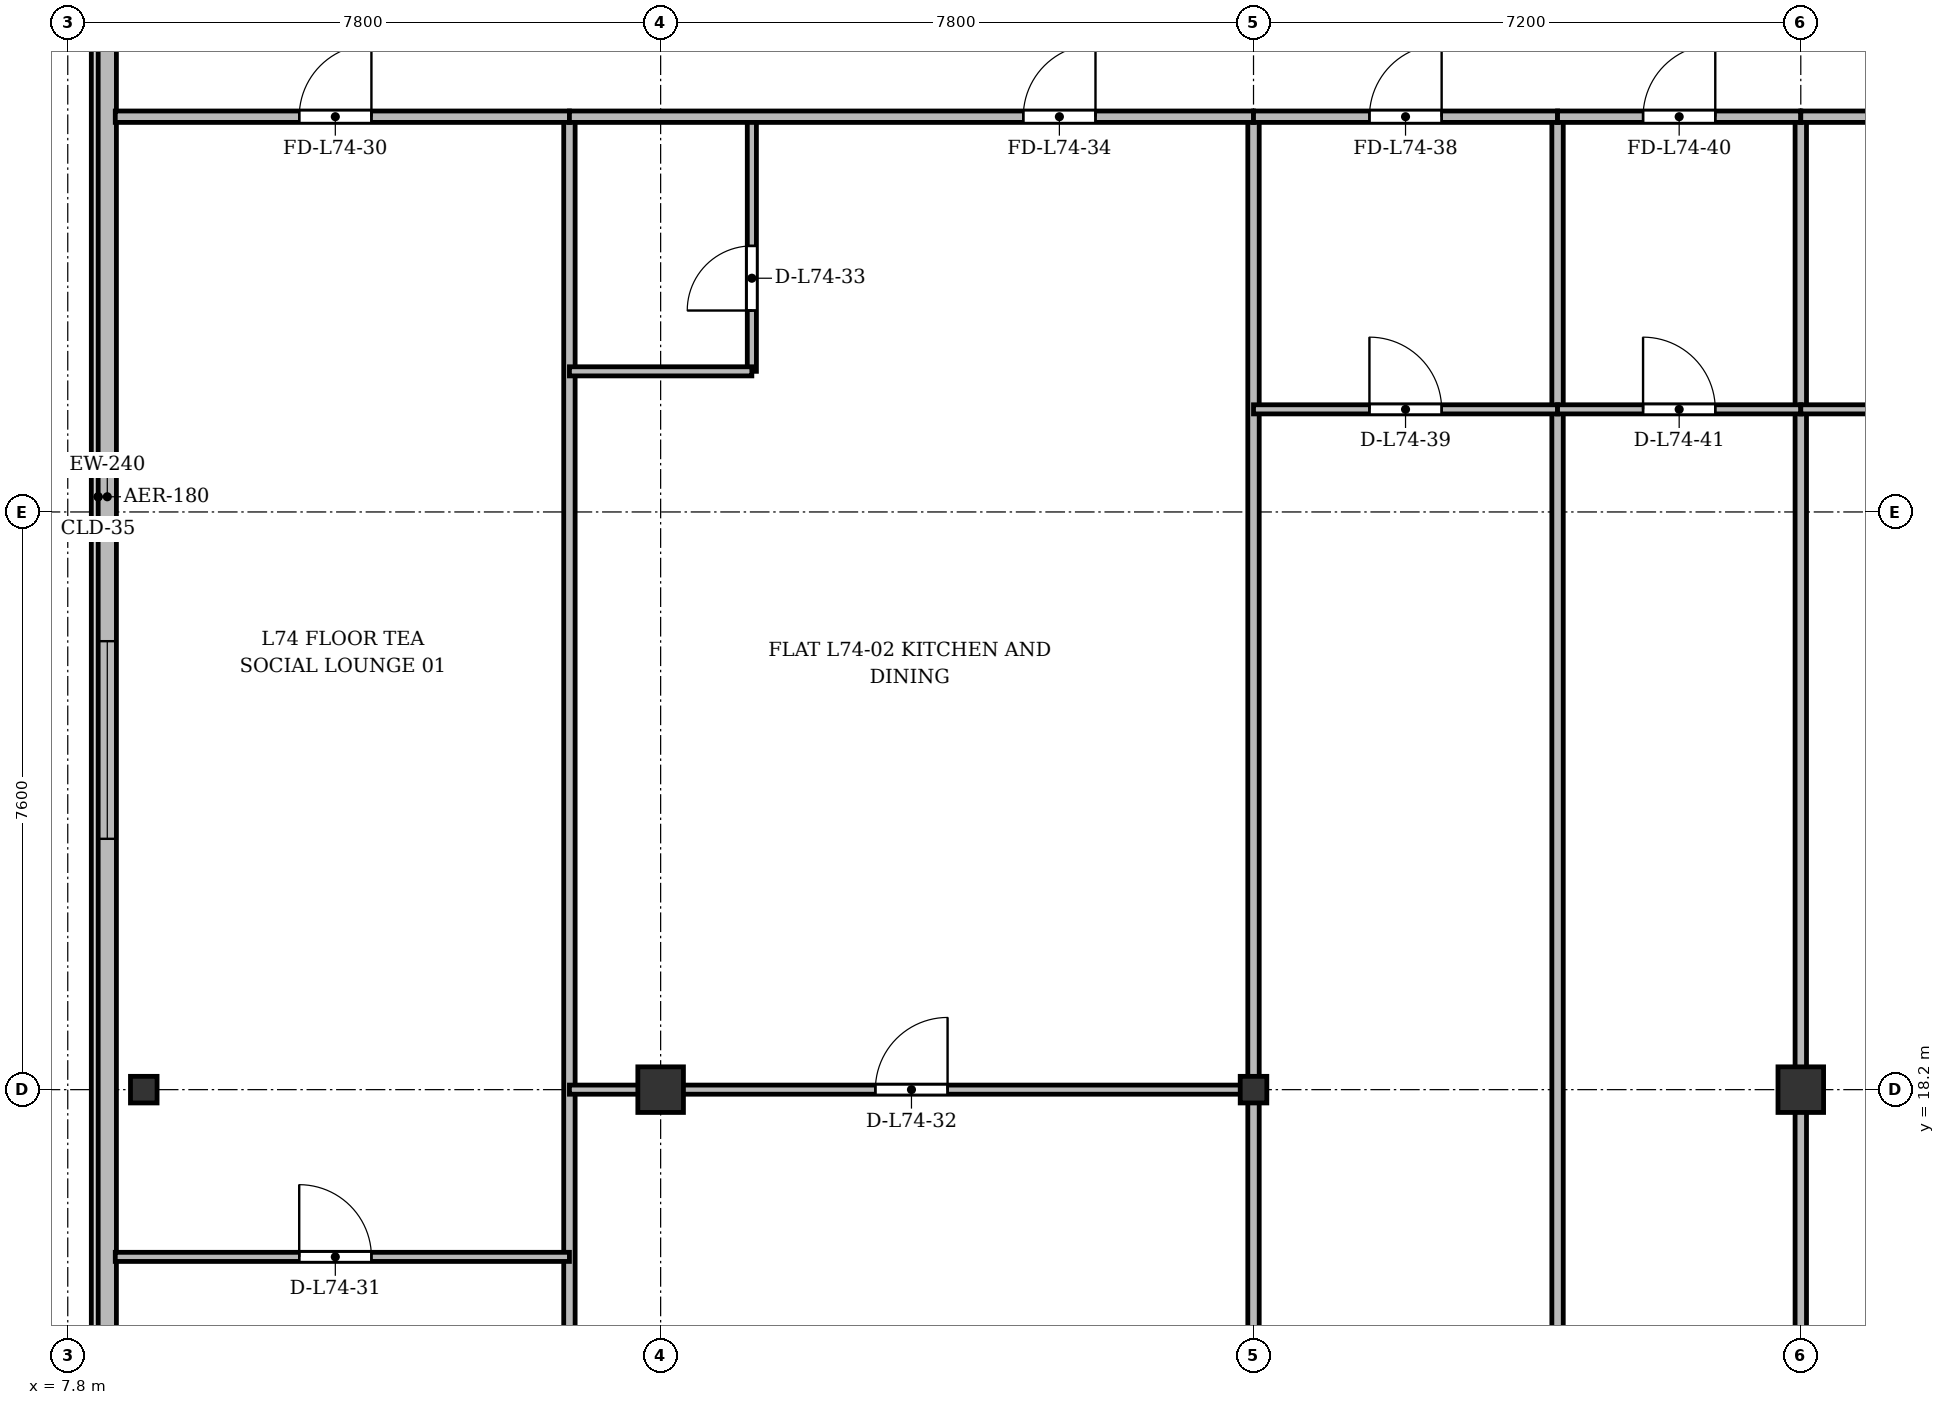
"""IFC4 building model, lengths in metres.
Left out: names, types, materials, properties, quantities, classifications, styles, units other than length and angle.
Written with IfcOpenShell. Run it as: python <this file> out.ifc"""

import sys

from ifc_helpers import new_model, si_unit, direction, frame, frame_2d, origin, origin_2d, place, context, subcontext, project, spatial, rectangle, i_section, extrude, source, transform, mapped, element, fill, save


model = new_model("IFC4")
c1 = context("Model", 3, precision=1e-05, world=origin(), true_north=direction((0.0, 1.0)))
c2 = subcontext(c1, "Body", "Model", "MODEL_VIEW")
j1 = project(units=[si_unit("LENGTHUNIT", "METRE"), si_unit("PLANEANGLEUNIT", "RADIAN")], contexts=[c1])
p1 = place(None, origin())
s1 = spatial("IfcSite", under=j1, at=p1, CompositionType="ELEMENT")
p2 = place(p1, origin())
s2 = spatial("IfcBuilding", under=s1, at=p2, CompositionType="ELEMENT")
p3 = place(p2, frame((0.0, 0.0, 284.7)))
s3 = spatial("IfcBuildingStorey", under=s2, at=p3, CompositionType="ELEMENT", Elevation=284.7)
m1 = source(origin(), c2, "Body", "SweptSolid", [
    extrude(i_section(OverallWidth=0.35, OverallDepth=0.35, WebThickness=0.018, FlangeThickness=0.028, at=origin_2d()), origin(), (0.0, 0.0, 1.0), 3.6),
])
p4 = place(p3, frame((8.8, 18.2, 0.0), z_axis=(0.0, 0.0, 1.0), x_axis=(1.0, 0.0, 0.0)))
e1 = element("IfcColumn", 1, at=p4, inside=s3, PredefinedType="COLUMN", context=c2, shape_type="MappedRepresentation", body=[
    mapped(m1, transform((0.0, 0.0, 0.0), x_axis=(1.0, 0.0, 0.0), y_axis=(0.0, 1.0, 0.0), z_axis=(0.0, 0.0, 1.0), scale=1.0)),
])
m2 = source(origin(), c2, "Body", "SweptSolid", [
    extrude(rectangle(XDim=0.6, YDim=0.6, at=origin_2d()), origin(), (0.0, 0.0, 1.0), 3.6),
])
p5 = place(p3, frame((15.6, 18.2, 0.0), z_axis=(0.0, 0.0, 1.0), x_axis=(1.0, 0.0, 0.0)))
e2 = element("IfcColumn", 2, at=p5, inside=s3, PredefinedType="COLUMN", context=c2, shape_type="MappedRepresentation", body=[
    mapped(m2, transform((0.0, 0.0, 0.0), x_axis=(1.0, 0.0, 0.0), y_axis=(0.0, 1.0, 0.0), z_axis=(0.0, 0.0, 1.0), scale=1.0)),
])
p6 = place(p3, frame((23.4, 18.2, 0.0), z_axis=(0.0, 0.0, 1.0), x_axis=(1.0, 0.0, 0.0)))
e3 = element("IfcColumn", 3, at=p6, inside=s3, PredefinedType="COLUMN", context=c2, shape_type="MappedRepresentation", body=[
    mapped(m1, transform((0.0, 0.0, 0.0), x_axis=(1.0, 0.0, 0.0), y_axis=(0.0, 1.0, 0.0), z_axis=(0.0, 0.0, 1.0), scale=1.0)),
])
p7 = place(p3, frame((30.6, 18.2, 0.0), z_axis=(0.0, 0.0, 1.0), x_axis=(1.0, 0.0, 0.0)))
e4 = element("IfcColumn", 4, at=p7, inside=s3, PredefinedType="COLUMN", context=c2, shape_type="MappedRepresentation", body=[
    mapped(m2, transform((0.0, 0.0, 0.0), x_axis=(1.0, 0.0, 0.0), y_axis=(0.0, 1.0, 0.0), z_axis=(0.0, 0.0, 1.0), scale=1.0)),
])
p8 = place(p3, frame((8.32, 6.5, 0.0), z_axis=(0.0, 0.0, 1.0), x_axis=(0.0, 1.0, 0.0)))
e5 = element("IfcWall", 5, at=p8, inside=s3, PredefinedType="SOLIDWALL", context=c2, shape_type="SweptSolid", body=[
    extrude(rectangle(XDim=39.0, YDim=0.24, at=frame_2d((19.5, 0.0))), origin(), (0.0, 0.0, 1.0), 3.37),
])
p9 = place(p8, frame((1.45, 0.0, 0.92)))
e6 = element("IfcOpeningElement", 6, at=p9, cuts=e5, PredefinedType="OPENING", context=c2, shape_type="SweptSolid", body=[
    extrude(rectangle(XDim=1.2, YDim=1.65, at=frame_2d((0.6, 0.825))), frame((0.0, 0.13, 0.0), z_axis=(0.0, -1.0, 0.0), x_axis=(1.0, 0.0, 0.0)), (0.0, 0.0, 1.0), 0.26),
])
p10 = place(p8, frame((3.6, 0.0, 0.92)))
e7 = element("IfcOpeningElement", 7, at=p10, cuts=e5, PredefinedType="OPENING", context=c2, shape_type="SweptSolid", body=[
    extrude(rectangle(XDim=2.6, YDim=1.9, at=frame_2d((1.3, 0.95))), frame((0.0, 0.13, 0.0), z_axis=(0.0, -1.0, 0.0), x_axis=(1.0, 0.0, 0.0)), (0.0, 0.0, 1.0), 0.26),
])
p11 = place(p8, frame((15.0, 0.0, 0.92)))
e8 = element("IfcOpeningElement", 8, at=p11, cuts=e5, PredefinedType="OPENING", context=c2, shape_type="SweptSolid", body=[
    extrude(rectangle(XDim=2.6, YDim=1.9, at=frame_2d((1.3, 0.95))), frame((0.0, 0.13, 0.0), z_axis=(0.0, -1.0, 0.0), x_axis=(1.0, 0.0, 0.0)), (0.0, 0.0, 1.0), 0.26),
])
p12 = place(p8, frame((29.0, 0.0, 0.92)))
e9 = element("IfcOpeningElement", 9, at=p12, cuts=e5, PredefinedType="OPENING", context=c2, shape_type="SweptSolid", body=[
    extrude(rectangle(XDim=2.6, YDim=1.9, at=frame_2d((1.3, 0.95))), frame((0.0, 0.13, 0.0), z_axis=(0.0, -1.0, 0.0), x_axis=(1.0, 0.0, 0.0)), (0.0, 0.0, 1.0), 0.26),
])
p13 = place(p8, frame((36.65, 0.0, 0.92)))
e10 = element("IfcOpeningElement", 10, at=p13, cuts=e5, PredefinedType="OPENING", context=c2, shape_type="SweptSolid", body=[
    extrude(rectangle(XDim=1.2, YDim=1.65, at=frame_2d((0.6, 0.825))), frame((0.0, 0.13, 0.0), z_axis=(0.0, -1.0, 0.0), x_axis=(1.0, 0.0, 0.0)), (0.0, 0.0, 1.0), 0.26),
])
p14 = place(p3, frame((14.4, 3.725, 0.0), z_axis=(0.0, 0.0, 1.0), x_axis=(0.0, 1.0, 0.0)))
e11 = element("IfcWall", 11, at=p14, inside=s3, PredefinedType="PARTITIONING", context=c2, shape_type="SweptSolid", body=[
    extrude(rectangle(XDim=27.275, YDim=0.15, at=frame_2d((13.637, 0.0))), origin(), (0.0, 0.0, 1.0), 2.92),
])
p15 = place(p3, frame((23.4, 3.725, 0.0), z_axis=(0.0, 0.0, 1.0), x_axis=(0.0, 1.0, 0.0)))
e12 = element("IfcWall", 12, at=p15, inside=s3, PredefinedType="PARTITIONING", context=c2, shape_type="SweptSolid", body=[
    extrude(rectangle(XDim=27.275, YDim=0.15, at=frame_2d((13.637, 0.0))), origin(), (0.0, 0.0, 1.0), 2.87),
])
p16 = place(p3, frame((27.4, 3.725, 0.0), z_axis=(0.0, 0.0, 1.0), x_axis=(0.0, 1.0, 0.0)))
e13 = element("IfcWall", 13, at=p16, inside=s3, PredefinedType="PARTITIONING", context=c2, shape_type="SweptSolid", body=[
    extrude(rectangle(XDim=27.275, YDim=0.15, at=frame_2d((13.637, 0.0))), origin(), (0.0, 0.0, 1.0), 2.92),
])
p17 = place(p3, frame((30.6, 3.725, 0.0), z_axis=(0.0, 0.0, 1.0), x_axis=(0.0, 1.0, 0.0)))
e14 = element("IfcWall", 14, at=p17, inside=s3, PredefinedType="PARTITIONING", context=c2, shape_type="SweptSolid", body=[
    extrude(rectangle(XDim=27.275, YDim=0.15, at=frame_2d((13.637, 0.0))), origin(), (0.0, 0.0, 1.0), 2.87),
])
p18 = place(p3, frame((8.425, 31.0, 0.0), z_axis=(0.0, 0.0, 1.0), x_axis=(1.0, 0.0, 0.0)))
e15 = element("IfcWall", 15, at=p18, inside=s3, PredefinedType="PARTITIONING", context=c2, shape_type="SweptSolid", body=[
    extrude(rectangle(XDim=5.975, YDim=0.15, at=frame_2d((2.987, 0.0))), origin(), (0.0, 0.0, 1.0), 2.87),
])
p19 = place(p18, frame((2.42, 0.0, 0.0)))
e16 = element("IfcOpeningElement", 16, at=p19, cuts=e15, PredefinedType="OPENING", context=c2, shape_type="SweptSolid", body=[
    extrude(rectangle(XDim=0.95, YDim=2.15, at=frame_2d((0.475, 1.075))), frame((0.0, 0.085, 0.0), z_axis=(0.0, -1.0, 0.0), x_axis=(1.0, 0.0, 0.0)), (0.0, 0.0, 1.0), 0.17),
])
p20 = place(p3, frame((8.425, 16.0, 0.0), z_axis=(0.0, 0.0, 1.0), x_axis=(1.0, 0.0, 0.0)))
e17 = element("IfcWall", 17, at=p20, inside=s3, PredefinedType="PARTITIONING", context=c2, shape_type="SweptSolid", body=[
    extrude(rectangle(XDim=5.975, YDim=0.12, at=frame_2d((2.987, 0.0))), origin(), (0.0, 0.0, 1.0), 2.87),
])
p21 = place(p20, frame((2.42, 0.0, 0.0)))
e18 = element("IfcOpeningElement", 18, at=p21, cuts=e17, PredefinedType="OPENING", context=c2, shape_type="SweptSolid", body=[
    extrude(rectangle(XDim=0.95, YDim=2.15, at=frame_2d((0.475, 1.075))), frame((0.0, 0.07, 0.0), z_axis=(0.0, -1.0, 0.0), x_axis=(1.0, 0.0, 0.0)), (0.0, 0.0, 1.0), 0.14),
])
p22 = place(p3, frame((14.4, 18.2, 0.0), z_axis=(0.0, 0.0, 1.0), x_axis=(1.0, 0.0, 0.0)))
e19 = element("IfcWall", 19, at=p22, inside=s3, PredefinedType="PARTITIONING", context=c2, shape_type="SweptSolid", body=[
    extrude(rectangle(XDim=9.0, YDim=0.12, at=frame_2d((4.5, 0.0))), origin(), (0.0, 0.0, 1.0), 2.92),
])
p23 = place(p22, frame((4.025, 0.0, 0.0)))
e20 = element("IfcOpeningElement", 20, at=p23, cuts=e19, PredefinedType="OPENING", context=c2, shape_type="SweptSolid", body=[
    extrude(rectangle(XDim=0.95, YDim=2.15, at=frame_2d((0.475, 1.075))), frame((0.0, 0.07, 0.0), z_axis=(0.0, -1.0, 0.0), x_axis=(1.0, 0.0, 0.0)), (0.0, 0.0, 1.0), 0.14),
])
p24 = place(p3, frame((16.8, 27.65, 0.0), z_axis=(0.0, 0.0, 1.0), x_axis=(0.0, 1.0, 0.0)))
e21 = element("IfcWall", 21, at=p24, inside=s3, PredefinedType="PARTITIONING", context=c2, shape_type="SweptSolid", body=[
    extrude(rectangle(XDim=3.35, YDim=0.12, at=frame_2d((1.675, 0.0))), origin(), (0.0, 0.0, 1.0), 3.37),
])
p25 = place(p24, frame((0.8, 0.0, 0.0)))
e22 = element("IfcOpeningElement", 22, at=p25, cuts=e21, PredefinedType="OPENING", context=c2, shape_type="SweptSolid", body=[
    extrude(rectangle(XDim=0.85, YDim=2.1, at=frame_2d((0.425, 1.05))), frame((0.0, 0.07, 0.0), z_axis=(0.0, -1.0, 0.0), x_axis=(1.0, 0.0, 0.0)), (0.0, 0.0, 1.0), 0.14),
])
p26 = place(p3, frame((14.4, 27.65, 0.0), z_axis=(0.0, 0.0, 1.0), x_axis=(1.0, 0.0, 0.0)))
e23 = element("IfcWall", 23, at=p26, inside=s3, PredefinedType="PARTITIONING", context=c2, shape_type="SweptSolid", body=[
    extrude(rectangle(XDim=2.4, YDim=0.12, at=frame_2d((1.2, 0.0))), origin(), (0.0, 0.0, 1.0), 2.87),
])
p27 = place(p3, frame((14.4, 31.0, 0.0), z_axis=(0.0, 0.0, 1.0), x_axis=(1.0, 0.0, 0.0)))
e24 = element("IfcWall", 24, at=p27, inside=s3, PredefinedType="PARTITIONING", context=c2, shape_type="SweptSolid", body=[
    extrude(rectangle(XDim=9.0, YDim=0.15, at=frame_2d((4.5, 0.0))), origin(), (0.0, 0.0, 1.0), 2.87),
])
p28 = place(p27, frame((5.971, 0.0, 0.0)))
e25 = element("IfcOpeningElement", 25, at=p28, cuts=e24, PredefinedType="OPENING", context=c2, shape_type="SweptSolid", body=[
    extrude(rectangle(XDim=0.95, YDim=2.15, at=frame_2d((0.475, 1.075))), frame((0.0, 0.085, 0.0), z_axis=(0.0, -1.0, 0.0), x_axis=(1.0, 0.0, 0.0)), (0.0, 0.0, 1.0), 0.17),
])
p29 = place(p3, frame((23.4, 31.0, 0.0), z_axis=(0.0, 0.0, 1.0), x_axis=(1.0, 0.0, 0.0)))
e26 = element("IfcWall", 26, at=p29, inside=s3, PredefinedType="PARTITIONING", context=c2, shape_type="SweptSolid", body=[
    extrude(rectangle(XDim=4.0, YDim=0.15, at=frame_2d((2.0, 0.0))), origin(), (0.0, 0.0, 1.0), 2.87),
])
p30 = place(p29, frame((1.525, 0.0, 0.0)))
e27 = element("IfcOpeningElement", 27, at=p30, cuts=e26, PredefinedType="OPENING", context=c2, shape_type="SweptSolid", body=[
    extrude(rectangle(XDim=0.95, YDim=2.15, at=frame_2d((0.475, 1.075))), frame((0.0, 0.085, 0.0), z_axis=(0.0, -1.0, 0.0), x_axis=(1.0, 0.0, 0.0)), (0.0, 0.0, 1.0), 0.17),
])
p31 = place(p3, frame((23.4, 27.15, 0.0), z_axis=(0.0, 0.0, 1.0), x_axis=(1.0, 0.0, 0.0)))
e28 = element("IfcWall", 28, at=p31, inside=s3, PredefinedType="PARTITIONING", context=c2, shape_type="SweptSolid", body=[
    extrude(rectangle(XDim=4.0, YDim=0.12, at=frame_2d((2.0, 0.0))), origin(), (0.0, 0.0, 1.0), 2.87),
])
p32 = place(p31, frame((1.525, 0.0, 0.0)))
e29 = element("IfcOpeningElement", 29, at=p32, cuts=e28, PredefinedType="OPENING", context=c2, shape_type="SweptSolid", body=[
    extrude(rectangle(XDim=0.95, YDim=2.15, at=frame_2d((0.475, 1.075))), frame((0.0, 0.07, 0.0), z_axis=(0.0, -1.0, 0.0), x_axis=(1.0, 0.0, 0.0)), (0.0, 0.0, 1.0), 0.14),
])
p33 = place(p3, frame((27.4, 31.0, 0.0), z_axis=(0.0, 0.0, 1.0), x_axis=(1.0, 0.0, 0.0)))
e30 = element("IfcWall", 30, at=p33, inside=s3, PredefinedType="PARTITIONING", context=c2, shape_type="SweptSolid", body=[
    extrude(rectangle(XDim=3.2, YDim=0.15, at=frame_2d((1.6, 0.0))), origin(), (0.0, 0.0, 1.0), 2.87),
])
p34 = place(p33, frame((1.125, 0.0, 0.0)))
e31 = element("IfcOpeningElement", 31, at=p34, cuts=e30, PredefinedType="OPENING", context=c2, shape_type="SweptSolid", body=[
    extrude(rectangle(XDim=0.95, YDim=2.15, at=frame_2d((0.475, 1.075))), frame((0.0, 0.085, 0.0), z_axis=(0.0, -1.0, 0.0), x_axis=(1.0, 0.0, 0.0)), (0.0, 0.0, 1.0), 0.17),
])
p35 = place(p3, frame((27.4, 27.15, 0.0), z_axis=(0.0, 0.0, 1.0), x_axis=(1.0, 0.0, 0.0)))
e32 = element("IfcWall", 32, at=p35, inside=s3, PredefinedType="PARTITIONING", context=c2, shape_type="SweptSolid", body=[
    extrude(rectangle(XDim=3.2, YDim=0.12, at=frame_2d((1.6, 0.0))), origin(), (0.0, 0.0, 1.0), 2.87),
])
p36 = place(p35, frame((1.125, 0.0, 0.0)))
e33 = element("IfcOpeningElement", 33, at=p36, cuts=e32, PredefinedType="OPENING", context=c2, shape_type="SweptSolid", body=[
    extrude(rectangle(XDim=0.95, YDim=2.15, at=frame_2d((0.475, 1.075))), frame((0.0, 0.07, 0.0), z_axis=(0.0, -1.0, 0.0), x_axis=(1.0, 0.0, 0.0)), (0.0, 0.0, 1.0), 0.14),
])
p37 = place(p3, frame((30.6, 31.0, 0.0), z_axis=(0.0, 0.0, 1.0), x_axis=(1.0, 0.0, 0.0)))
e34 = element("IfcWall", 34, at=p37, inside=s3, PredefinedType="PARTITIONING", context=c2, shape_type="SweptSolid", body=[
    extrude(rectangle(XDim=7.6, YDim=0.15, at=frame_2d((3.8, 0.0))), origin(), (0.0, 0.0, 1.0), 2.87),
])
p38 = place(p37, frame((3.325, 0.0, 0.0)))
e35 = element("IfcOpeningElement", 35, at=p38, cuts=e34, PredefinedType="OPENING", context=c2, shape_type="SweptSolid", body=[
    extrude(rectangle(XDim=0.95, YDim=2.15, at=frame_2d((0.475, 1.075))), frame((0.0, 0.085, 0.0), z_axis=(0.0, -1.0, 0.0), x_axis=(1.0, 0.0, 0.0)), (0.0, 0.0, 1.0), 0.17),
])
p39 = place(p3, frame((30.6, 27.15, 0.0), z_axis=(0.0, 0.0, 1.0), x_axis=(1.0, 0.0, 0.0)))
e36 = element("IfcWall", 36, at=p39, inside=s3, PredefinedType="PARTITIONING", context=c2, shape_type="SweptSolid", body=[
    extrude(rectangle(XDim=7.6, YDim=0.12, at=frame_2d((3.8, 0.0))), origin(), (0.0, 0.0, 1.0), 2.87),
])
p40 = place(p39, frame((3.325, 0.0, 0.0)))
e37 = element("IfcOpeningElement", 37, at=p40, cuts=e36, PredefinedType="OPENING", context=c2, shape_type="SweptSolid", body=[
    extrude(rectangle(XDim=0.95, YDim=2.15, at=frame_2d((0.475, 1.075))), frame((0.0, 0.07, 0.0), z_axis=(0.0, -1.0, 0.0), x_axis=(1.0, 0.0, 0.0)), (0.0, 0.0, 1.0), 0.14),
])
m3 = source(origin(), c2, "Body", "SweptSolid", [
    extrude(rectangle(XDim=2.6, YDim=1.9, at=frame_2d((1.3, 0.95))), frame((0.0, 0.03, 0.0), z_axis=(0.0, -1.0, 0.0), x_axis=(1.0, 0.0, 0.0)), (0.0, 0.0, 1.0), 0.06),
])
p41 = place(p11, origin())
e38 = element("IfcWindow", 38, at=p41, inside=s3, PartitioningType="SINGLE_PANEL", PredefinedType="WINDOW", context=c2, shape_type="MappedRepresentation", body=[
    mapped(m3, transform((0.0, 0.0, 0.0), x_axis=(1.0, 0.0, 0.0), y_axis=(0.0, 1.0, 0.0), z_axis=(0.0, 0.0, 1.0), scale=1.0)),
])
fill(e8, e38)
m4 = source(origin(), c2, "Body", "SweptSolid", [
    extrude(rectangle(XDim=0.95, YDim=2.15, at=frame_2d((0.475, 1.075))), frame((0.0, 0.025, 0.0), z_axis=(0.0, -1.0, 0.0), x_axis=(1.0, 0.0, 0.0)), (0.0, 0.0, 1.0), 0.05),
])
p42 = place(p19, origin())
e39 = element("IfcDoor", 39, at=p42, inside=s3, OperationType="SINGLE_SWING_RIGHT", PredefinedType="DOOR", context=c2, shape_type="MappedRepresentation", body=[
    mapped(m4, transform((0.0, 0.0, 0.0), x_axis=(1.0, 0.0, 0.0), y_axis=(0.0, 1.0, 0.0), z_axis=(0.0, 0.0, 1.0), scale=1.0)),
])
fill(e16, e39)
p43 = place(p21, origin())
e40 = element("IfcDoor", 40, at=p43, inside=s3, OperationType="SINGLE_SWING_LEFT", PredefinedType="DOOR", context=c2, shape_type="MappedRepresentation", body=[
    mapped(m4, transform((0.0, 0.0, 0.0), x_axis=(1.0, 0.0, 0.0), y_axis=(0.0, 1.0, 0.0), z_axis=(0.0, 0.0, 1.0), scale=1.0)),
])
fill(e18, e40)
p44 = place(p23, origin())
e41 = element("IfcDoor", 41, at=p44, inside=s3, OperationType="SINGLE_SWING_RIGHT", PredefinedType="DOOR", context=c2, shape_type="MappedRepresentation", body=[
    mapped(m4, transform((0.0, 0.0, 0.0), x_axis=(1.0, 0.0, 0.0), y_axis=(0.0, 1.0, 0.0), z_axis=(0.0, 0.0, 1.0), scale=1.0)),
])
fill(e20, e41)
m5 = source(origin(), c2, "Body", "SweptSolid", [
    extrude(rectangle(XDim=0.85, YDim=2.1, at=frame_2d((0.425, 1.05))), frame((0.0, 0.025, 0.0), z_axis=(0.0, -1.0, 0.0), x_axis=(1.0, 0.0, 0.0)), (0.0, 0.0, 1.0), 0.05),
])
p45 = place(p25, origin())
e42 = element("IfcDoor", 42, at=p45, inside=s3, OperationType="SINGLE_SWING_LEFT", PredefinedType="DOOR", context=c2, shape_type="MappedRepresentation", body=[
    mapped(m5, transform((0.0, 0.0, 0.0), x_axis=(1.0, 0.0, 0.0), y_axis=(0.0, 1.0, 0.0), z_axis=(0.0, 0.0, 1.0), scale=1.0)),
])
fill(e22, e42)
p46 = place(p28, origin())
e43 = element("IfcDoor", 43, at=p46, inside=s3, OperationType="SINGLE_SWING_RIGHT", PredefinedType="DOOR", context=c2, shape_type="MappedRepresentation", body=[
    mapped(m4, transform((0.0, 0.0, 0.0), x_axis=(1.0, 0.0, 0.0), y_axis=(0.0, 1.0, 0.0), z_axis=(0.0, 0.0, 1.0), scale=1.0)),
])
fill(e25, e43)
p47 = place(p30, origin())
e44 = element("IfcDoor", 44, at=p47, inside=s3, OperationType="SINGLE_SWING_RIGHT", PredefinedType="DOOR", context=c2, shape_type="MappedRepresentation", body=[
    mapped(m4, transform((0.0, 0.0, 0.0), x_axis=(1.0, 0.0, 0.0), y_axis=(0.0, 1.0, 0.0), z_axis=(0.0, 0.0, 1.0), scale=1.0)),
])
fill(e27, e44)
p48 = place(p32, origin())
e45 = element("IfcDoor", 45, at=p48, inside=s3, OperationType="SINGLE_SWING_LEFT", PredefinedType="DOOR", context=c2, shape_type="MappedRepresentation", body=[
    mapped(m4, transform((0.0, 0.0, 0.0), x_axis=(1.0, 0.0, 0.0), y_axis=(0.0, 1.0, 0.0), z_axis=(0.0, 0.0, 1.0), scale=1.0)),
])
fill(e29, e45)
p49 = place(p34, origin())
e46 = element("IfcDoor", 46, at=p49, inside=s3, OperationType="SINGLE_SWING_RIGHT", PredefinedType="DOOR", context=c2, shape_type="MappedRepresentation", body=[
    mapped(m4, transform((0.0, 0.0, 0.0), x_axis=(1.0, 0.0, 0.0), y_axis=(0.0, 1.0, 0.0), z_axis=(0.0, 0.0, 1.0), scale=1.0)),
])
fill(e31, e46)
p50 = place(p36, origin())
e47 = element("IfcDoor", 47, at=p50, inside=s3, OperationType="SINGLE_SWING_LEFT", PredefinedType="DOOR", context=c2, shape_type="MappedRepresentation", body=[
    mapped(m4, transform((0.0, 0.0, 0.0), x_axis=(1.0, 0.0, 0.0), y_axis=(0.0, 1.0, 0.0), z_axis=(0.0, 0.0, 1.0), scale=1.0)),
])
fill(e33, e47)
save(model, sys.argv[1])
